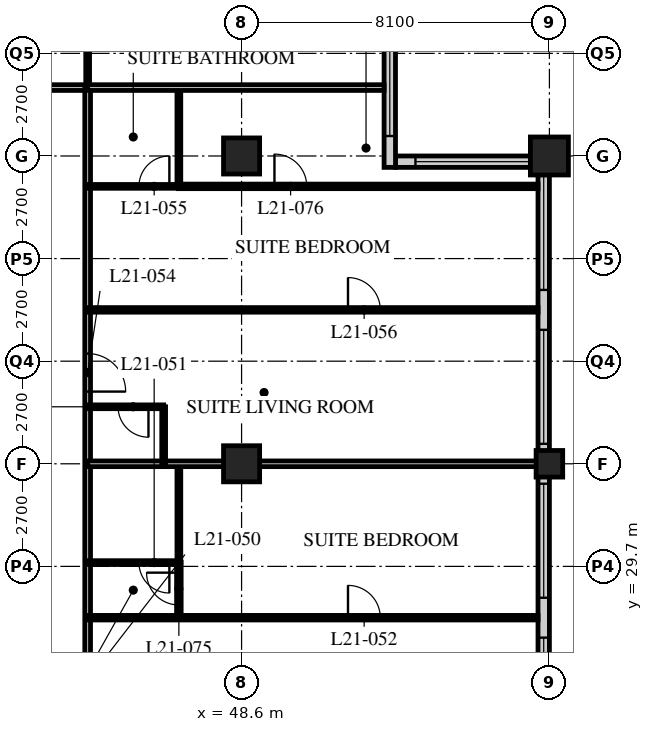
"""IFC4 building model, lengths in metres.
Left out: names, types, materials, properties, quantities, classifications, styles, units other than length and angle.
Written with IfcOpenShell. Run it as: python <this file> out.ifc"""

import sys

from ifc_helpers import new_model, si_unit, direction, frame, frame_2d, origin, origin_2d, place, context, subcontext, project, spatial, rectangle, hollow_rectangle, extrude, element, fill, save


model = new_model("IFC4")
c1 = context("Model", 3, precision=1e-05, world=origin(), true_north=direction((0.0, 1.0)))
c2 = subcontext(c1, "Body", "Model", "MODEL_VIEW")
j1 = project(units=[si_unit("LENGTHUNIT", "METRE"), si_unit("PLANEANGLEUNIT", "RADIAN")], contexts=[c1])
p1 = place(None, origin())
s1 = spatial("IfcSite", under=j1, at=p1, CompositionType="ELEMENT")
p2 = place(p1, origin())
s2 = spatial("IfcBuilding", under=s1, at=p2, CompositionType="ELEMENT")
p3 = place(p2, frame((0.0, 0.0, 84.0)))
s3 = spatial("IfcBuildingStorey", under=s2, at=p3, CompositionType="ELEMENT", Elevation=84.0)
for number, where, z_axis, x_axis in (
    (1, (48.6, 32.4, 0.0), (0.0, 0.0, 1.0), (1.0, 0.0, 0.0)),
    (2, (48.6, 40.5, 0.0), (0.0, 0.0, 1.0), (1.0, 0.0, 0.0)),
):
    element("IfcColumn", number, at=place(p3, frame(where, z_axis=z_axis, x_axis=x_axis)), inside=s3, PredefinedType="COLUMN", context=c2, shape_type="SweptSolid", body=[
        extrude(hollow_rectangle(XDim=0.95, YDim=0.95, WallThickness=0.095, at=origin_2d()), origin(), (0.0, 0.0, 1.0), 3.4),
    ])
p4 = place(p3, frame((56.7, 32.4, 0.0), z_axis=(0.0, 0.0, 1.0), x_axis=(1.0, 0.0, 0.0)))
e3 = element("IfcColumn", 3, at=p4, inside=s3, PredefinedType="COLUMN", context=c2, shape_type="SweptSolid", body=[
    extrude(hollow_rectangle(XDim=0.7, YDim=0.7, WallThickness=0.06, at=origin_2d()), origin(), (0.0, 0.0, 1.0), 3.4),
])
p5 = place(p3, frame((56.7, 40.5, 0.0), z_axis=(0.0, 0.0, 1.0), x_axis=(1.0, 0.0, 0.0)))
e4 = element("IfcColumn", 4, at=p5, inside=s3, PredefinedType="COLUMN", context=c2, shape_type="SweptSolid", body=[
    extrude(hollow_rectangle(XDim=1.0, YDim=1.0, WallThickness=0.1, at=origin_2d()), origin(), (0.0, 0.0, 1.0), 3.4),
])
p6 = place(p3, frame((56.55, 8.4, 0.0), z_axis=(0.0, 0.0, 1.0), x_axis=(0.0, 1.0, 0.0)))
e5 = element("IfcWall", 5, at=p6, inside=s3, PredefinedType="SOLIDWALL", context=c2, shape_type="SweptSolid", body=[
    extrude(rectangle(XDim=32.1, YDim=0.3, at=frame_2d((16.05, 0.0))), origin(), (0.0, 0.0, 1.0), 3.19),
])
p7 = place(p6, frame((0.225, 0.0, 0.9)))
e6 = element("IfcOpeningElement", 6, at=p7, cuts=e5, PredefinedType="OPENING", context=c2, shape_type="SweptSolid", body=[
    extrude(rectangle(XDim=3.0, YDim=1.5, at=frame_2d((1.5, 0.75))), frame((0.0, 0.16, 0.0), z_axis=(0.0, -1.0, 0.0), x_axis=(1.0, 0.0, 0.0)), (0.0, 0.0, 1.0), 0.32),
])
p8 = place(p6, frame((4.275, 0.0, 0.9)))
e7 = element("IfcOpeningElement", 7, at=p8, cuts=e5, PredefinedType="OPENING", context=c2, shape_type="SweptSolid", body=[
    extrude(rectangle(XDim=3.0, YDim=1.5, at=frame_2d((1.5, 0.75))), frame((0.0, 0.16, 0.0), z_axis=(0.0, -1.0, 0.0), x_axis=(1.0, 0.0, 0.0)), (0.0, 0.0, 1.0), 0.32),
])
p9 = place(p6, frame((8.325, 0.0, 0.9)))
e8 = element("IfcOpeningElement", 8, at=p9, cuts=e5, PredefinedType="OPENING", context=c2, shape_type="SweptSolid", body=[
    extrude(rectangle(XDim=3.0, YDim=1.5, at=frame_2d((1.5, 0.75))), frame((0.0, 0.16, 0.0), z_axis=(0.0, -1.0, 0.0), x_axis=(1.0, 0.0, 0.0)), (0.0, 0.0, 1.0), 0.32),
])
p10 = place(p6, frame((12.375, 0.0, 0.9)))
e9 = element("IfcOpeningElement", 9, at=p10, cuts=e5, PredefinedType="OPENING", context=c2, shape_type="SweptSolid", body=[
    extrude(rectangle(XDim=3.0, YDim=1.5, at=frame_2d((1.5, 0.75))), frame((0.0, 0.16, 0.0), z_axis=(0.0, -1.0, 0.0), x_axis=(1.0, 0.0, 0.0)), (0.0, 0.0, 1.0), 0.32),
])
p11 = place(p6, frame((16.425, 0.0, 0.9)))
e10 = element("IfcOpeningElement", 10, at=p11, cuts=e5, PredefinedType="OPENING", context=c2, shape_type="SweptSolid", body=[
    extrude(rectangle(XDim=3.0, YDim=1.5, at=frame_2d((1.5, 0.75))), frame((0.0, 0.16, 0.0), z_axis=(0.0, -1.0, 0.0), x_axis=(1.0, 0.0, 0.0)), (0.0, 0.0, 1.0), 0.32),
])
p12 = place(p6, frame((20.475, 0.0, 0.9)))
e11 = element("IfcOpeningElement", 11, at=p12, cuts=e5, PredefinedType="OPENING", context=c2, shape_type="SweptSolid", body=[
    extrude(rectangle(XDim=3.0, YDim=1.5, at=frame_2d((1.5, 0.75))), frame((0.0, 0.16, 0.0), z_axis=(0.0, -1.0, 0.0), x_axis=(1.0, 0.0, 0.0)), (0.0, 0.0, 1.0), 0.32),
])
p13 = place(p6, frame((24.525, 0.0, 0.9)))
e12 = element("IfcOpeningElement", 12, at=p13, cuts=e5, PredefinedType="OPENING", context=c2, shape_type="SweptSolid", body=[
    extrude(rectangle(XDim=3.0, YDim=1.5, at=frame_2d((1.5, 0.75))), frame((0.0, 0.16, 0.0), z_axis=(0.0, -1.0, 0.0), x_axis=(1.0, 0.0, 0.0)), (0.0, 0.0, 1.0), 0.32),
])
p14 = place(p6, frame((28.575, 0.0, 0.9)))
e13 = element("IfcOpeningElement", 13, at=p14, cuts=e5, PredefinedType="OPENING", context=c2, shape_type="SweptSolid", body=[
    extrude(rectangle(XDim=3.0, YDim=1.5, at=frame_2d((1.5, 0.75))), frame((0.0, 0.16, 0.0), z_axis=(0.0, -1.0, 0.0), x_axis=(1.0, 0.0, 0.0)), (0.0, 0.0, 1.0), 0.32),
])
p15 = place(p3, frame((56.4, 40.35, 0.0), z_axis=(0.0, 0.0, 1.0), x_axis=(-1.0, 0.0, 0.0)))
e14 = element("IfcWall", 14, at=p15, inside=s3, PredefinedType="SOLIDWALL", context=c2, shape_type="SweptSolid", body=[
    extrude(rectangle(XDim=3.75, YDim=0.3, at=frame_2d((1.875, 0.0))), origin(), (0.0, 0.0, 1.0), 3.19),
])
p16 = place(p15, frame((0.225, 0.0, 0.9)))
e15 = element("IfcOpeningElement", 15, at=p16, cuts=e14, PredefinedType="OPENING", context=c2, shape_type="SweptSolid", body=[
    extrude(rectangle(XDim=3.0, YDim=1.5, at=frame_2d((1.5, 0.75))), frame((0.0, 0.16, 0.0), z_axis=(0.0, -1.0, 0.0), x_axis=(1.0, 0.0, 0.0)), (0.0, 0.0, 1.0), 0.32),
])
p17 = place(p3, frame((52.5, 40.2, 0.0), z_axis=(0.0, 0.0, 1.0), x_axis=(0.0, 1.0, 0.0)))
e16 = element("IfcWall", 16, at=p17, inside=s3, PredefinedType="SOLIDWALL", context=c2, shape_type="SweptSolid", body=[
    extrude(rectangle(XDim=4.35, YDim=0.3, at=frame_2d((2.175, 0.0))), origin(), (0.0, 0.0, 1.0), 3.19),
])
p18 = place(p17, frame((0.825, 0.0, 0.9)))
e17 = element("IfcOpeningElement", 17, at=p18, cuts=e16, PredefinedType="OPENING", context=c2, shape_type="SweptSolid", body=[
    extrude(rectangle(XDim=3.0, YDim=1.5, at=frame_2d((1.5, 0.75))), frame((0.0, 0.16, 0.0), z_axis=(0.0, -1.0, 0.0), x_axis=(1.0, 0.0, 0.0)), (0.0, 0.0, 1.0), 0.32),
])
p19 = place(p3, frame((12.15, 42.3, 0.0), z_axis=(0.0, 0.0, 1.0), x_axis=(1.0, 0.0, 0.0)))
e18 = element("IfcWall", 18, at=p19, inside=s3, PredefinedType="PARTITIONING", context=c2, shape_type="SweptSolid", body=[
    extrude(rectangle(XDim=32.4, YDim=0.15, at=frame_2d((16.2, 0.0))), origin(), (0.0, 0.0, 1.0), 3.19),
])
p20 = place(p19, frame((5.95, 0.0, 0.0)))
e19 = element("IfcOpeningElement", 19, at=p20, cuts=e18, PredefinedType="OPENING", context=c2, shape_type="SweptSolid", body=[
    extrude(rectangle(XDim=1.0, YDim=2.1, at=frame_2d((0.5, 1.05))), frame((0.0, 0.085, 0.0), z_axis=(0.0, -1.0, 0.0), x_axis=(1.0, 0.0, 0.0)), (0.0, 0.0, 1.0), 0.17),
])
p21 = place(p19, frame((14.6, 0.0, 0.0)))
e20 = element("IfcOpeningElement", 20, at=p21, cuts=e18, PredefinedType="OPENING", context=c2, shape_type="SweptSolid", body=[
    extrude(rectangle(XDim=1.0, YDim=2.1, at=frame_2d((0.5, 1.05))), frame((0.0, 0.085, 0.0), z_axis=(0.0, -1.0, 0.0), x_axis=(1.0, 0.0, 0.0)), (0.0, 0.0, 1.0), 0.17),
])
p22 = place(p19, frame((18.65, 0.0, 0.0)))
e21 = element("IfcOpeningElement", 21, at=p22, cuts=e18, PredefinedType="OPENING", context=c2, shape_type="SweptSolid", body=[
    extrude(rectangle(XDim=1.0, YDim=2.1, at=frame_2d((0.5, 1.05))), frame((0.0, 0.085, 0.0), z_axis=(0.0, -1.0, 0.0), x_axis=(1.0, 0.0, 0.0)), (0.0, 0.0, 1.0), 0.17),
])
p23 = place(p19, frame((22.15, 0.0, 0.0)))
e22 = element("IfcOpeningElement", 22, at=p23, cuts=e18, PredefinedType="OPENING", context=c2, shape_type="SweptSolid", body=[
    extrude(rectangle(XDim=1.0, YDim=2.1, at=frame_2d((0.5, 1.05))), frame((0.0, 0.085, 0.0), z_axis=(0.0, -1.0, 0.0), x_axis=(1.0, 0.0, 0.0)), (0.0, 0.0, 1.0), 0.17),
])
p24 = place(p19, frame((29.025, 0.0, 0.0)))
e23 = element("IfcOpeningElement", 23, at=p24, cuts=e18, PredefinedType="OPENING", context=c2, shape_type="SweptSolid", body=[
    extrude(rectangle(XDim=1.0, YDim=2.1, at=frame_2d((0.5, 1.05))), frame((0.0, 0.085, 0.0), z_axis=(0.0, -1.0, 0.0), x_axis=(1.0, 0.0, 0.0)), (0.0, 0.0, 1.0), 0.17),
])
p25 = place(p19, frame((2.375, 0.0, 0.0)))
e24 = element("IfcOpeningElement", 24, at=p25, cuts=e18, PredefinedType="OPENING", context=c2, shape_type="SweptSolid", body=[
    extrude(rectangle(XDim=1.0, YDim=2.1, at=frame_2d((0.5, 1.05))), frame((0.0, 0.085, 0.0), z_axis=(0.0, -1.0, 0.0), x_axis=(1.0, 0.0, 0.0)), (0.0, 0.0, 1.0), 0.17),
])
p26 = place(p3, frame((44.55, 16.2, 0.0), z_axis=(0.0, 0.0, 1.0), x_axis=(0.0, 1.0, 0.0)))
e25 = element("IfcWall", 25, at=p26, inside=s3, PredefinedType="PARTITIONING", context=c2, shape_type="SweptSolid", body=[
    extrude(rectangle(XDim=26.1, YDim=0.15, at=frame_2d((13.05, 0.0))), origin(), (0.0, 0.0, 1.0), 3.19),
])
p27 = place(p26, frame((2.75, 0.0, 0.0)))
e26 = element("IfcOpeningElement", 26, at=p27, cuts=e25, PredefinedType="OPENING", context=c2, shape_type="SweptSolid", body=[
    extrude(rectangle(XDim=1.0, YDim=2.1, at=frame_2d((0.5, 1.05))), frame((0.0, 0.085, 0.0), z_axis=(0.0, -1.0, 0.0), x_axis=(1.0, 0.0, 0.0)), (0.0, 0.0, 1.0), 0.17),
])
p28 = place(p26, frame((6.5, 0.0, 0.0)))
e27 = element("IfcOpeningElement", 27, at=p28, cuts=e25, PredefinedType="OPENING", context=c2, shape_type="SweptSolid", body=[
    extrude(rectangle(XDim=1.0, YDim=2.1, at=frame_2d((0.5, 1.05))), frame((0.0, 0.085, 0.0), z_axis=(0.0, -1.0, 0.0), x_axis=(1.0, 0.0, 0.0)), (0.0, 0.0, 1.0), 0.17),
])
p29 = place(p26, frame((10.0, 0.0, 0.0)))
e28 = element("IfcOpeningElement", 28, at=p29, cuts=e25, PredefinedType="OPENING", context=c2, shape_type="SweptSolid", body=[
    extrude(rectangle(XDim=1.0, YDim=2.1, at=frame_2d((0.5, 1.05))), frame((0.0, 0.085, 0.0), z_axis=(0.0, -1.0, 0.0), x_axis=(1.0, 0.0, 0.0)), (0.0, 0.0, 1.0), 0.17),
])
p30 = place(p26, frame((18.1, 0.0, 0.0)))
e29 = element("IfcOpeningElement", 29, at=p30, cuts=e25, PredefinedType="OPENING", context=c2, shape_type="SweptSolid", body=[
    extrude(rectangle(XDim=1.0, YDim=2.1, at=frame_2d((0.5, 1.05))), frame((0.0, 0.085, 0.0), z_axis=(0.0, -1.0, 0.0), x_axis=(1.0, 0.0, 0.0)), (0.0, 0.0, 1.0), 0.17),
])
p31 = place(p3, frame((46.95, 29.8, 0.0), z_axis=(0.0, 0.0, 1.0), x_axis=(0.0, 1.0, 0.0)))
e30 = element("IfcWall", 30, at=p31, inside=s3, PredefinedType="PARTITIONING", context=c2, shape_type="SweptSolid", body=[
    extrude(rectangle(XDim=2.6, YDim=0.1, at=frame_2d((1.3, 0.0))), origin(), (0.0, 0.0, 1.0), 3.19),
])
p32 = place(p3, frame((44.55, 29.8, 0.0), z_axis=(0.0, 0.0, 1.0), x_axis=(1.0, 0.0, 0.0)))
e31 = element("IfcWall", 31, at=p32, inside=s3, PredefinedType="PARTITIONING", context=c2, shape_type="SweptSolid", body=[
    extrude(rectangle(XDim=2.4, YDim=0.1, at=frame_2d((1.2, 0.0))), origin(), (0.0, 0.0, 1.0), 3.19),
])
p33 = place(p32, frame((1.35, 0.0, 0.0)))
e32 = element("IfcOpeningElement", 32, at=p33, cuts=e31, PredefinedType="OPENING", context=c2, shape_type="SweptSolid", body=[
    extrude(rectangle(XDim=0.8, YDim=2.1, at=frame_2d((0.4, 1.05))), frame((0.0, 0.06, 0.0), z_axis=(0.0, -1.0, 0.0), x_axis=(1.0, 0.0, 0.0)), (0.0, 0.0, 1.0), 0.12),
])
p34 = place(p3, frame((44.55, 28.35, 0.0), z_axis=(0.0, 0.0, 1.0), x_axis=(1.0, 0.0, 0.0)))
e33 = element("IfcWall", 33, at=p34, inside=s3, PredefinedType="PARTITIONING", context=c2, shape_type="SweptSolid", body=[
    extrude(rectangle(XDim=11.85, YDim=0.12, at=frame_2d((5.925, 0.0))), origin(), (0.0, 0.0, 1.0), 3.19),
])
p35 = place(p34, frame((6.85, 0.0, 0.0)))
e34 = element("IfcOpeningElement", 34, at=p35, cuts=e33, PredefinedType="OPENING", context=c2, shape_type="SweptSolid", body=[
    extrude(rectangle(XDim=0.85, YDim=2.1, at=frame_2d((0.425, 1.05))), frame((0.0, 0.07, 0.0), z_axis=(0.0, -1.0, 0.0), x_axis=(1.0, 0.0, 0.0)), (0.0, 0.0, 1.0), 0.14),
])
p36 = place(p3, frame((44.55, 32.4, 0.0), z_axis=(0.0, 0.0, 1.0), x_axis=(1.0, 0.0, 0.0)))
e35 = element("IfcWall", 35, at=p36, inside=s3, PredefinedType="PARTITIONING", context=c2, shape_type="SweptSolid", body=[
    extrude(rectangle(XDim=11.85, YDim=0.15, at=frame_2d((5.925, 0.0))), origin(), (0.0, 0.0, 1.0), 2.428),
])
p37 = place(p3, frame((46.55, 32.4, 0.0), z_axis=(0.0, 0.0, 1.0), x_axis=(0.0, 1.0, 0.0)))
e36 = element("IfcWall", 36, at=p37, inside=s3, PredefinedType="PARTITIONING", context=c2, shape_type="SweptSolid", body=[
    extrude(rectangle(XDim=1.5, YDim=0.1, at=frame_2d((0.75, 0.0))), origin(), (0.0, 0.0, 1.0), 3.19),
])
p38 = place(p3, frame((44.55, 33.9, 0.0), z_axis=(0.0, 0.0, 1.0), x_axis=(1.0, 0.0, 0.0)))
e37 = element("IfcWall", 37, at=p38, inside=s3, PredefinedType="PARTITIONING", context=c2, shape_type="SweptSolid", body=[
    extrude(rectangle(XDim=2.0, YDim=0.1, at=frame_2d((1.0, 0.0))), origin(), (0.0, 0.0, 1.0), 3.19),
])
p39 = place(p38, frame((0.8, 0.0, 0.0)))
e38 = element("IfcOpeningElement", 38, at=p39, cuts=e37, PredefinedType="OPENING", context=c2, shape_type="SweptSolid", body=[
    extrude(rectangle(XDim=0.8, YDim=2.1, at=frame_2d((0.4, 1.05))), frame((0.0, 0.06, 0.0), z_axis=(0.0, -1.0, 0.0), x_axis=(1.0, 0.0, 0.0)), (0.0, 0.0, 1.0), 0.12),
])
p40 = place(p3, frame((46.95, 39.7, 0.0), z_axis=(0.0, 0.0, 1.0), x_axis=(0.0, 1.0, 0.0)))
e39 = element("IfcWall", 39, at=p40, inside=s3, PredefinedType="PARTITIONING", context=c2, shape_type="SweptSolid", body=[
    extrude(rectangle(XDim=2.6, YDim=0.1, at=frame_2d((1.3, 0.0))), origin(), (0.0, 0.0, 1.0), 3.19),
])
p41 = place(p3, frame((44.55, 39.7, 0.0), z_axis=(0.0, 0.0, 1.0), x_axis=(1.0, 0.0, 0.0)))
e40 = element("IfcWall", 40, at=p41, inside=s3, PredefinedType="PARTITIONING", context=c2, shape_type="SweptSolid", body=[
    extrude(rectangle(XDim=2.4, YDim=0.1, at=frame_2d((1.2, 0.0))), origin(), (0.0, 0.0, 1.0), 3.19),
])
p42 = place(p41, frame((1.35, 0.0, 0.0)))
e41 = element("IfcOpeningElement", 41, at=p42, cuts=e40, PredefinedType="OPENING", context=c2, shape_type="SweptSolid", body=[
    extrude(rectangle(XDim=0.8, YDim=2.1, at=frame_2d((0.4, 1.05))), frame((0.0, 0.06, 0.0), z_axis=(0.0, -1.0, 0.0), x_axis=(1.0, 0.0, 0.0)), (0.0, 0.0, 1.0), 0.12),
])
p43 = place(p3, frame((44.55, 36.45, 0.0), z_axis=(0.0, 0.0, 1.0), x_axis=(1.0, 0.0, 0.0)))
e42 = element("IfcWall", 42, at=p43, inside=s3, PredefinedType="PARTITIONING", context=c2, shape_type="SweptSolid", body=[
    extrude(rectangle(XDim=11.85, YDim=0.12, at=frame_2d((5.925, 0.0))), origin(), (0.0, 0.0, 1.0), 3.19),
])
p44 = place(p43, frame((6.85, 0.0, 0.0)))
e43 = element("IfcOpeningElement", 43, at=p44, cuts=e42, PredefinedType="OPENING", context=c2, shape_type="SweptSolid", body=[
    extrude(rectangle(XDim=0.85, YDim=2.1, at=frame_2d((0.425, 1.05))), frame((0.0, 0.07, 0.0), z_axis=(0.0, -1.0, 0.0), x_axis=(1.0, 0.0, 0.0)), (0.0, 0.0, 1.0), 0.14),
])
p45 = place(p3, frame((44.55, 42.3, 0.0), z_axis=(0.0, 0.0, 1.0), x_axis=(0.0, 1.0, 0.0)))
e44 = element("IfcWall", 44, at=p45, inside=s3, PredefinedType="PARTITIONING", context=c2, shape_type="SweptSolid", body=[
    extrude(rectangle(XDim=2.4, YDim=0.1, at=frame_2d((1.2, 0.0))), origin(), (0.0, 0.0, 1.0), 3.19),
])
p46 = place(p3, frame((44.55, 42.3, 0.0), z_axis=(0.0, 0.0, 1.0), x_axis=(1.0, 0.0, 0.0)))
e45 = element("IfcWall", 45, at=p46, inside=s3, PredefinedType="PARTITIONING", context=c2, shape_type="SweptSolid", body=[
    extrude(rectangle(XDim=7.8, YDim=0.15, at=frame_2d((3.9, 0.0))), origin(), (0.0, 0.0, 1.0), 3.19),
])
p47 = place(p3, frame((46.95, 29.81, 0.0), z_axis=(0.0, 0.0, 1.0), x_axis=(0.0, -1.0, 0.0)))
e46 = element("IfcWall", 46, at=p47, inside=s3, PredefinedType="PARTITIONING", context=c2, shape_type="SweptSolid", body=[
    extrude(rectangle(XDim=1.46, YDim=0.12, at=frame_2d((0.73, 0.0))), origin(), (0.0, 0.0, 1.0), 3.19),
])
p48 = place(p47, frame((0.275, 0.0, 0.0)))
e47 = element("IfcOpeningElement", 47, at=p48, cuts=e46, PredefinedType="OPENING", context=c2, shape_type="SweptSolid", body=[
    extrude(rectangle(XDim=0.85, YDim=2.1, at=frame_2d((0.425, 1.05))), frame((0.0, 0.07, 0.0), z_axis=(0.0, -1.0, 0.0), x_axis=(1.0, 0.0, 0.0)), (0.0, 0.0, 1.0), 0.14),
])
p49 = place(p3, frame((56.4, 39.7, 0.0), z_axis=(0.0, 0.0, 1.0), x_axis=(-1.0, 0.0, 0.0)))
e48 = element("IfcWall", 48, at=p49, inside=s3, PredefinedType="PARTITIONING", context=c2, shape_type="SweptSolid", body=[
    extrude(rectangle(XDim=9.46, YDim=0.12, at=frame_2d((4.73, 0.0))), origin(), (0.0, 0.0, 1.0), 3.19),
])
p50 = place(p49, frame((6.085, 0.0, 0.0)))
e49 = element("IfcOpeningElement", 49, at=p50, cuts=e48, PredefinedType="OPENING", context=c2, shape_type="SweptSolid", body=[
    extrude(rectangle(XDim=0.85, YDim=2.1, at=frame_2d((0.425, 1.05))), frame((0.0, 0.07, 0.0), z_axis=(0.0, -1.0, 0.0), x_axis=(1.0, 0.0, 0.0)), (0.0, 0.0, 1.0), 0.14),
])
p51 = place(p11, origin())
e50 = element("IfcWindow", 50, at=p51, inside=s3, PartitioningType="SINGLE_PANEL", PredefinedType="WINDOW", context=c2, shape_type="SweptSolid", body=[
    extrude(rectangle(XDim=3.0, YDim=1.5, at=frame_2d((1.5, 0.75))), frame((0.0, 0.03, 0.0), z_axis=(0.0, -1.0, 0.0), x_axis=(1.0, 0.0, 0.0)), (0.0, 0.0, 1.0), 0.06),
])
fill(e10, e50)
p52 = place(p12, origin())
e51 = element("IfcWindow", 51, at=p52, inside=s3, PartitioningType="SINGLE_PANEL", PredefinedType="WINDOW", context=c2, shape_type="SweptSolid", body=[
    extrude(rectangle(XDim=3.0, YDim=1.5, at=frame_2d((1.5, 0.75))), frame((0.0, 0.03, 0.0), z_axis=(0.0, -1.0, 0.0), x_axis=(1.0, 0.0, 0.0)), (0.0, 0.0, 1.0), 0.06),
])
fill(e11, e51)
p53 = place(p13, origin())
e52 = element("IfcWindow", 52, at=p53, inside=s3, PartitioningType="SINGLE_PANEL", PredefinedType="WINDOW", context=c2, shape_type="SweptSolid", body=[
    extrude(rectangle(XDim=3.0, YDim=1.5, at=frame_2d((1.5, 0.75))), frame((0.0, 0.03, 0.0), z_axis=(0.0, -1.0, 0.0), x_axis=(1.0, 0.0, 0.0)), (0.0, 0.0, 1.0), 0.06),
])
fill(e12, e52)
p54 = place(p14, origin())
e53 = element("IfcWindow", 53, at=p54, inside=s3, PartitioningType="SINGLE_PANEL", PredefinedType="WINDOW", context=c2, shape_type="SweptSolid", body=[
    extrude(rectangle(XDim=3.0, YDim=1.5, at=frame_2d((1.5, 0.75))), frame((0.0, 0.03, 0.0), z_axis=(0.0, -1.0, 0.0), x_axis=(1.0, 0.0, 0.0)), (0.0, 0.0, 1.0), 0.06),
])
fill(e13, e53)
p55 = place(p16, origin())
e54 = element("IfcWindow", 54, at=p55, inside=s3, PartitioningType="SINGLE_PANEL", PredefinedType="WINDOW", context=c2, shape_type="SweptSolid", body=[
    extrude(rectangle(XDim=3.0, YDim=1.5, at=frame_2d((1.5, 0.75))), frame((0.0, 0.03, 0.0), z_axis=(0.0, -1.0, 0.0), x_axis=(1.0, 0.0, 0.0)), (0.0, 0.0, 1.0), 0.06),
])
fill(e15, e54)
p56 = place(p18, origin())
e55 = element("IfcWindow", 55, at=p56, inside=s3, PartitioningType="SINGLE_PANEL", PredefinedType="WINDOW", context=c2, shape_type="SweptSolid", body=[
    extrude(rectangle(XDim=3.0, YDim=1.5, at=frame_2d((1.5, 0.75))), frame((0.0, 0.03, 0.0), z_axis=(0.0, -1.0, 0.0), x_axis=(1.0, 0.0, 0.0)), (0.0, 0.0, 1.0), 0.06),
])
fill(e17, e55)
p57 = place(p33, origin())
e56 = element("IfcDoor", 56, at=p57, inside=s3, OperationType="SINGLE_SWING_LEFT", PredefinedType="DOOR", context=c2, shape_type="SweptSolid", body=[
    extrude(rectangle(XDim=0.8, YDim=2.1, at=frame_2d((0.4, 1.05))), frame((0.0, 0.025, 0.0), z_axis=(0.0, -1.0, 0.0), x_axis=(1.0, 0.0, 0.0)), (0.0, 0.0, 1.0), 0.05),
])
fill(e32, e56)
p58 = place(p35, origin())
e57 = element("IfcDoor", 57, at=p58, inside=s3, OperationType="SINGLE_SWING_LEFT", PredefinedType="DOOR", context=c2, shape_type="SweptSolid", body=[
    extrude(rectangle(XDim=0.85, YDim=2.1, at=frame_2d((0.425, 1.05))), frame((0.0, 0.025, 0.0), z_axis=(0.0, -1.0, 0.0), x_axis=(1.0, 0.0, 0.0)), (0.0, 0.0, 1.0), 0.05),
])
fill(e34, e57)
p59 = place(p39, origin())
e58 = element("IfcDoor", 58, at=p59, inside=s3, OperationType="SINGLE_SWING_LEFT", PredefinedType="DOOR", context=c2, shape_type="SweptSolid", body=[
    extrude(rectangle(XDim=0.8, YDim=2.1, at=frame_2d((0.4, 1.05))), frame((0.0, 0.025, 0.0), z_axis=(0.0, -1.0, 0.0), x_axis=(1.0, 0.0, 0.0)), (0.0, 0.0, 1.0), 0.05),
])
fill(e38, e58)
p60 = place(p30, origin())
e59 = element("IfcDoor", 59, at=p60, inside=s3, OperationType="SINGLE_SWING_RIGHT", PredefinedType="DOOR", context=c2, shape_type="SweptSolid", body=[
    extrude(rectangle(XDim=1.0, YDim=2.1, at=frame_2d((0.5, 1.05))), frame((0.0, 0.025, 0.0), z_axis=(0.0, -1.0, 0.0), x_axis=(1.0, 0.0, 0.0)), (0.0, 0.0, 1.0), 0.05),
])
fill(e29, e59)
p61 = place(p42, origin())
e60 = element("IfcDoor", 60, at=p61, inside=s3, OperationType="SINGLE_SWING_RIGHT", PredefinedType="DOOR", context=c2, shape_type="SweptSolid", body=[
    extrude(rectangle(XDim=0.8, YDim=2.1, at=frame_2d((0.4, 1.05))), frame((0.0, 0.025, 0.0), z_axis=(0.0, -1.0, 0.0), x_axis=(1.0, 0.0, 0.0)), (0.0, 0.0, 1.0), 0.05),
])
fill(e41, e60)
p62 = place(p44, origin())
e61 = element("IfcDoor", 61, at=p62, inside=s3, OperationType="SINGLE_SWING_LEFT", PredefinedType="DOOR", context=c2, shape_type="SweptSolid", body=[
    extrude(rectangle(XDim=0.85, YDim=2.1, at=frame_2d((0.425, 1.05))), frame((0.0, 0.025, 0.0), z_axis=(0.0, -1.0, 0.0), x_axis=(1.0, 0.0, 0.0)), (0.0, 0.0, 1.0), 0.05),
])
fill(e43, e61)
p63 = place(p48, origin())
e62 = element("IfcDoor", 62, at=p63, inside=s3, OperationType="SINGLE_SWING_RIGHT", PredefinedType="DOOR", context=c2, shape_type="SweptSolid", body=[
    extrude(rectangle(XDim=0.85, YDim=2.1, at=frame_2d((0.425, 1.05))), frame((0.0, 0.025, 0.0), z_axis=(0.0, -1.0, 0.0), x_axis=(1.0, 0.0, 0.0)), (0.0, 0.0, 1.0), 0.05),
])
fill(e47, e62)
p64 = place(p50, origin())
e63 = element("IfcDoor", 63, at=p64, inside=s3, OperationType="SINGLE_SWING_LEFT", PredefinedType="DOOR", context=c2, shape_type="SweptSolid", body=[
    extrude(rectangle(XDim=0.85, YDim=2.1, at=frame_2d((0.425, 1.05))), frame((0.0, 0.025, 0.0), z_axis=(0.0, -1.0, 0.0), x_axis=(1.0, 0.0, 0.0)), (0.0, 0.0, 1.0), 0.05),
])
fill(e49, e63)
save(model, sys.argv[1])
